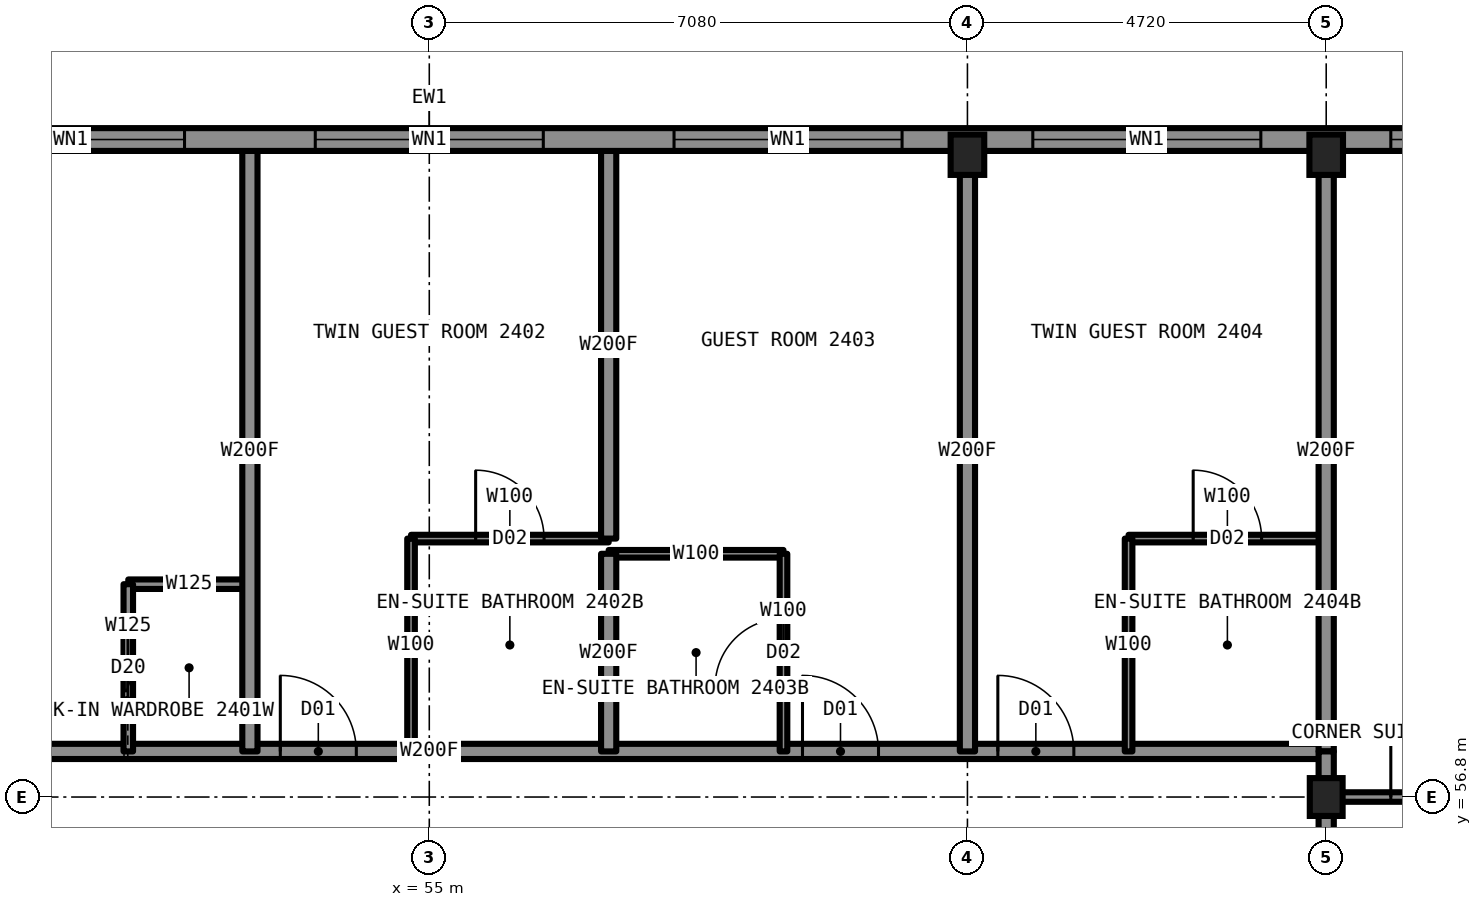
"""IFC4 building model, lengths in metres.
Left out: names, types, materials, properties, quantities, classifications, styles, units other than length and angle.
Written with IfcOpenShell. Run it as: python <this file> out.ifc"""

import sys

from ifc_helpers import new_model, si_unit, direction, frame, frame_2d, origin, origin_2d, place, context, subcontext, project, spatial, rectangle, i_section, extrude, element, fill, save


model = new_model("IFC4")
c1 = context("Model", 3, precision=1e-05, world=origin(), true_north=direction((0.0, 1.0)))
c2 = subcontext(c1, "Body", "Model", "MODEL_VIEW")
j1 = project(units=[si_unit("LENGTHUNIT", "METRE"), si_unit("PLANEANGLEUNIT", "RADIAN")], contexts=[c1])
p1 = place(None, origin())
s1 = spatial("IfcSite", under=j1, at=p1, CompositionType="ELEMENT")
p2 = place(p1, origin())
s2 = spatial("IfcBuilding", under=s1, at=p2, CompositionType="ELEMENT")
p3 = place(p2, frame((0.0, 0.0, 93.4)))
s3 = spatial("IfcBuildingStorey", under=s2, at=p3, CompositionType="ELEMENT", Elevation=93.4)
for number, where, z_axis, x_axis in (
    (1, (62.08, 65.25, 0.0), (0.0, 0.0, 1.0), (1.0, 0.0, 0.0)),
    (2, (66.8, 65.25, 0.0), (0.0, 0.0, 1.0), (1.0, 0.0, 0.0)),
):
    element("IfcColumn", number, at=place(p3, frame(where, z_axis=z_axis, x_axis=x_axis)), inside=s3, PredefinedType="COLUMN", context=c2, shape_type="SweptSolid", body=[
        extrude(i_section(OverallWidth=0.442, OverallDepth=0.531, WebThickness=0.066, FlangeThickness=0.106, at=origin_2d()), origin(), (0.0, 0.0, 1.0), 3.5),
    ])
p4 = place(p3, frame((66.8, 56.8, 0.0), z_axis=(0.0, 0.0, 1.0), x_axis=(1.0, 0.0, 0.0)))
e3 = element("IfcColumn", 3, at=p4, inside=s3, PredefinedType="COLUMN", context=c2, shape_type="SweptSolid", body=[
    extrude(i_section(OverallWidth=0.432, OverallDepth=0.498, WebThickness=0.056, FlangeThickness=0.089, at=origin_2d()), origin(), (0.0, 0.0, 1.0), 3.5),
])
p5 = place(p3, frame((66.8, 56.8, 0.0), z_axis=(0.0, 0.0, 1.0), x_axis=(1.0, 0.0, 0.0)))
e4 = element("IfcWall", 4, at=p5, inside=s3, PredefinedType="PARTITIONING", context=c2, shape_type="SweptSolid", body=[
    extrude(rectangle(XDim=8.5, YDim=0.125, at=frame_2d((4.25, 0.0))), origin(), (0.0, 0.0, 1.0), 2.573),
])
p6 = place(p5, frame((0.85, 0.0, 0.0)))
e5 = element("IfcOpeningElement", 5, at=p6, cuts=e4, PredefinedType="OPENING", context=c2, shape_type="SweptSolid", body=[
    extrude(rectangle(XDim=0.9, YDim=2.2, at=frame_2d((0.45, 1.1))), frame((0.0, 0.073, 0.0), z_axis=(0.0, -1.0, 0.0), x_axis=(1.0, 0.0, 0.0)), (0.0, 0.0, 1.0), 0.145),
])
p7 = place(p3, frame((43.2, 57.4, 0.0), z_axis=(0.0, 0.0, 1.0), x_axis=(1.0, 0.0, 0.0)))
e6 = element("IfcWall", 6, at=p7, inside=s3, PredefinedType="PARTITIONING", context=c2, shape_type="SweptSolid", body=[
    extrude(rectangle(XDim=23.6, YDim=0.2, at=frame_2d((11.8, 0.0))), origin(), (0.0, 0.0, 1.0), 3.33),
])
p8 = place(p7, frame((3.0, 0.0, 0.0)))
e7 = element("IfcOpeningElement", 7, at=p8, cuts=e6, PredefinedType="OPENING", context=c2, shape_type="SweptSolid", body=[
    extrude(rectangle(XDim=1.0, YDim=2.2, at=frame_2d((0.5, 1.1))), frame((0.0, 0.11, 0.0), z_axis=(0.0, -1.0, 0.0), x_axis=(1.0, 0.0, 0.0)), (0.0, 0.0, 1.0), 0.22),
])
p9 = place(p7, frame((9.84, 0.0, 0.0)))
e8 = element("IfcOpeningElement", 8, at=p9, cuts=e6, PredefinedType="OPENING", context=c2, shape_type="SweptSolid", body=[
    extrude(rectangle(XDim=1.0, YDim=2.2, at=frame_2d((0.5, 1.1))), frame((0.0, 0.11, 0.0), z_axis=(0.0, -1.0, 0.0), x_axis=(1.0, 0.0, 0.0)), (0.0, 0.0, 1.0), 0.22),
])
p10 = place(p7, frame((16.71, 0.0, 0.0)))
e9 = element("IfcOpeningElement", 9, at=p10, cuts=e6, PredefinedType="OPENING", context=c2, shape_type="SweptSolid", body=[
    extrude(rectangle(XDim=1.0, YDim=2.2, at=frame_2d((0.5, 1.1))), frame((0.0, 0.11, 0.0), z_axis=(0.0, -1.0, 0.0), x_axis=(1.0, 0.0, 0.0)), (0.0, 0.0, 1.0), 0.22),
])
p11 = place(p7, frame((19.28, 0.0, 0.0)))
e10 = element("IfcOpeningElement", 10, at=p11, cuts=e6, PredefinedType="OPENING", context=c2, shape_type="SweptSolid", body=[
    extrude(rectangle(XDim=1.0, YDim=2.2, at=frame_2d((0.5, 1.1))), frame((0.0, 0.11, 0.0), z_axis=(0.0, -1.0, 0.0), x_axis=(1.0, 0.0, 0.0)), (0.0, 0.0, 1.0), 0.22),
])
p12 = place(p3, frame((51.04, 59.6, 0.0), z_axis=(0.0, 0.0, 1.0), x_axis=(1.0, 0.0, 0.0)))
e11 = element("IfcWall", 11, at=p12, inside=s3, PredefinedType="PARTITIONING", context=c2, shape_type="SweptSolid", body=[
    extrude(rectangle(XDim=1.6, YDim=0.125, at=frame_2d((0.8, 0.0))), origin(), (0.0, 0.0, 1.0), 3.33),
])
p13 = place(p3, frame((57.36, 60.0, 0.0), z_axis=(0.0, 0.0, 1.0), x_axis=(1.0, 0.0, 0.0)))
e12 = element("IfcWall", 12, at=p13, inside=s3, PredefinedType="PARTITIONING", context=c2, shape_type="SweptSolid", body=[
    extrude(rectangle(XDim=2.3, YDim=0.1, at=frame_2d((1.15, 0.0))), origin(), (0.0, 0.0, 1.0), 2.731),
])
p14 = place(p3, frame((54.76, 60.2, 0.0), z_axis=(0.0, 0.0, 1.0), x_axis=(1.0, 0.0, 0.0)))
e13 = element("IfcWall", 13, at=p14, inside=s3, PredefinedType="PARTITIONING", context=c2, shape_type="SweptSolid", body=[
    extrude(rectangle(XDim=2.6, YDim=0.1, at=frame_2d((1.3, 0.0))), origin(), (0.0, 0.0, 1.0), 2.731),
])
p15 = place(p14, frame((0.85, 0.0, 0.0)))
e14 = element("IfcOpeningElement", 14, at=p15, cuts=e13, PredefinedType="OPENING", context=c2, shape_type="SweptSolid", body=[
    extrude(rectangle(XDim=0.9, YDim=2.1, at=frame_2d((0.45, 1.05))), frame((0.0, 0.06, 0.0), z_axis=(0.0, -1.0, 0.0), x_axis=(1.0, 0.0, 0.0)), (0.0, 0.0, 1.0), 0.12),
])
p16 = place(p3, frame((64.2, 60.2, 0.0), z_axis=(0.0, 0.0, 1.0), x_axis=(1.0, 0.0, 0.0)))
e15 = element("IfcWall", 15, at=p16, inside=s3, PredefinedType="PARTITIONING", context=c2, shape_type="SweptSolid", body=[
    extrude(rectangle(XDim=2.6, YDim=0.1, at=frame_2d((1.3, 0.0))), origin(), (0.0, 0.0, 1.0), 2.731),
])
p17 = place(p16, frame((0.85, 0.0, 0.0)))
e16 = element("IfcOpeningElement", 16, at=p17, cuts=e15, PredefinedType="OPENING", context=c2, shape_type="SweptSolid", body=[
    extrude(rectangle(XDim=0.9, YDim=2.1, at=frame_2d((0.45, 1.05))), frame((0.0, 0.06, 0.0), z_axis=(0.0, -1.0, 0.0), x_axis=(1.0, 0.0, 0.0)), (0.0, 0.0, 1.0), 0.12),
])
p18 = place(p3, frame((54.76, 57.4, 0.0), z_axis=(0.0, 0.0, 1.0), x_axis=(0.0, 1.0, 0.0)))
e17 = element("IfcWall", 17, at=p18, inside=s3, PredefinedType="PARTITIONING", context=c2, shape_type="SweptSolid", body=[
    extrude(rectangle(XDim=2.8, YDim=0.1, at=frame_2d((1.4, 0.0))), origin(), (0.0, 0.0, 1.0), 3.33),
])
p19 = place(p3, frame((52.64, 57.4, 0.0), z_axis=(0.0, 0.0, 1.0), x_axis=(0.0, 1.0, 0.0)))
e18 = element("IfcWall", 18, at=p19, inside=s3, PredefinedType="PARTITIONING", context=c2, shape_type="SweptSolid", body=[
    extrude(rectangle(XDim=7.9, YDim=0.2, at=frame_2d((3.95, 0.0))), origin(), (0.0, 0.0, 1.0), 3.33),
])
p20 = place(p3, frame((51.04, 57.4, 0.0), z_axis=(0.0, 0.0, 1.0), x_axis=(0.0, 1.0, 0.0)))
e19 = element("IfcWall", 19, at=p20, inside=s3, PredefinedType="PARTITIONING", context=c2, shape_type="SweptSolid", body=[
    extrude(rectangle(XDim=2.2, YDim=0.125, at=frame_2d((1.1, 0.0))), origin(), (0.0, 0.0, 1.0), 3.33),
])
p21 = place(p20, frame((0.7, 0.0, 0.0)))
e20 = element("IfcOpeningElement", 20, at=p21, cuts=e19, PredefinedType="OPENING", context=c2, shape_type="SweptSolid", body=[
    extrude(rectangle(XDim=0.8, YDim=2.1, at=frame_2d((0.4, 1.05))), frame((0.0, 0.073, 0.0), z_axis=(0.0, -1.0, 0.0), x_axis=(1.0, 0.0, 0.0)), (0.0, 0.0, 1.0), 0.145),
])
p22 = place(p3, frame((66.8, 33.22, 0.0), z_axis=(0.0, 0.0, 1.0), x_axis=(0.0, 1.0, 0.0)))
e21 = element("IfcWall", 21, at=p22, inside=s3, PredefinedType="PARTITIONING", context=c2, shape_type="SweptSolid", body=[
    extrude(rectangle(XDim=23.56, YDim=0.2, at=frame_2d((11.78, 0.0))), origin(), (0.0, 0.0, 1.0), 3.33),
])
p23 = place(p22, frame((6.16, 0.0, 0.0)))
e22 = element("IfcOpeningElement", 22, at=p23, cuts=e21, PredefinedType="OPENING", context=c2, shape_type="SweptSolid", body=[
    extrude(rectangle(XDim=1.0, YDim=2.2, at=frame_2d((0.5, 1.1))), frame((0.0, 0.11, 0.0), z_axis=(0.0, -1.0, 0.0), x_axis=(1.0, 0.0, 0.0)), (0.0, 0.0, 1.0), 0.22),
])
p24 = place(p22, frame((12.42, 0.0, 0.0)))
e23 = element("IfcOpeningElement", 23, at=p24, cuts=e21, PredefinedType="OPENING", context=c2, shape_type="SweptSolid", body=[
    extrude(rectangle(XDim=1.0, YDim=2.2, at=frame_2d((0.5, 1.1))), frame((0.0, 0.11, 0.0), z_axis=(0.0, -1.0, 0.0), x_axis=(1.0, 0.0, 0.0)), (0.0, 0.0, 1.0), 0.22),
])
p25 = place(p22, frame((21.82, 0.0, 0.0)))
e24 = element("IfcOpeningElement", 24, at=p25, cuts=e21, PredefinedType="OPENING", context=c2, shape_type="SweptSolid", body=[
    extrude(rectangle(XDim=1.1, YDim=2.2, at=frame_2d((0.55, 1.1))), frame((0.0, 0.11, 0.0), z_axis=(0.0, -1.0, 0.0), x_axis=(1.0, 0.0, 0.0)), (0.0, 0.0, 1.0), 0.22),
])
p26 = place(p22, frame((0.64, 0.0, 0.0)))
e25 = element("IfcOpeningElement", 25, at=p26, cuts=e21, PredefinedType="OPENING", context=c2, shape_type="SweptSolid", body=[
    extrude(rectangle(XDim=1.1, YDim=2.2, at=frame_2d((0.55, 1.1))), frame((0.0, 0.11, 0.0), z_axis=(0.0, -1.0, 0.0), x_axis=(1.0, 0.0, 0.0)), (0.0, 0.0, 1.0), 0.22),
])
p27 = place(p3, frame((66.8, 57.4, 0.0), z_axis=(0.0, 0.0, 1.0), x_axis=(0.0, 1.0, 0.0)))
e26 = element("IfcWall", 26, at=p27, inside=s3, PredefinedType="PARTITIONING", context=c2, shape_type="SweptSolid", body=[
    extrude(rectangle(XDim=7.9, YDim=0.2, at=frame_2d((3.95, 0.0))), origin(), (0.0, 0.0, 1.0), 2.573),
])
p28 = place(p3, frame((57.36, 57.4, 0.0), z_axis=(0.0, 0.0, 1.0), x_axis=(0.0, 1.0, 0.0)))
e27 = element("IfcWall", 27, at=p28, inside=s3, PredefinedType="PARTITIONING", context=c2, shape_type="SweptSolid", body=[
    extrude(rectangle(XDim=2.6, YDim=0.2, at=frame_2d((1.3, 0.0))), origin(), (0.0, 0.0, 1.0), 3.33),
])
p29 = place(p3, frame((57.36, 60.2, 0.0), z_axis=(0.0, 0.0, 1.0), x_axis=(0.0, 1.0, 0.0)))
e28 = element("IfcWall", 28, at=p29, inside=s3, PredefinedType="PARTITIONING", context=c2, shape_type="SweptSolid", body=[
    extrude(rectangle(XDim=5.1, YDim=0.2, at=frame_2d((2.55, 0.0))), origin(), (0.0, 0.0, 1.0), 3.33),
])
p30 = place(p3, frame((59.66, 57.4, 0.0), z_axis=(0.0, 0.0, 1.0), x_axis=(0.0, 1.0, 0.0)))
e29 = element("IfcWall", 29, at=p30, inside=s3, PredefinedType="PARTITIONING", context=c2, shape_type="SweptSolid", body=[
    extrude(rectangle(XDim=2.6, YDim=0.1, at=frame_2d((1.3, 0.0))), origin(), (0.0, 0.0, 1.0), 3.33),
])
p31 = place(p30, frame((0.85, 0.0, 0.0)))
e30 = element("IfcOpeningElement", 30, at=p31, cuts=e29, PredefinedType="OPENING", context=c2, shape_type="SweptSolid", body=[
    extrude(rectangle(XDim=0.9, YDim=2.1, at=frame_2d((0.45, 1.05))), frame((0.0, 0.06, 0.0), z_axis=(0.0, -1.0, 0.0), x_axis=(1.0, 0.0, 0.0)), (0.0, 0.0, 1.0), 0.12),
])
p32 = place(p3, frame((62.08, 57.4, 0.0), z_axis=(0.0, 0.0, 1.0), x_axis=(0.0, 1.0, 0.0)))
e31 = element("IfcWall", 31, at=p32, inside=s3, PredefinedType="PARTITIONING", context=c2, shape_type="SweptSolid", body=[
    extrude(rectangle(XDim=7.9, YDim=0.2, at=frame_2d((3.95, 0.0))), origin(), (0.0, 0.0, 1.0), 2.573),
])
p33 = place(p3, frame((64.2, 57.4, 0.0), z_axis=(0.0, 0.0, 1.0), x_axis=(0.0, 1.0, 0.0)))
e32 = element("IfcWall", 32, at=p33, inside=s3, PredefinedType="PARTITIONING", context=c2, shape_type="SweptSolid", body=[
    extrude(rectangle(XDim=2.8, YDim=0.1, at=frame_2d((1.4, 0.0))), origin(), (0.0, 0.0, 1.0), 3.33),
])
p34 = place(p3, frame((70.1, 65.45, 0.0), z_axis=(0.0, 0.0, 1.0), x_axis=(-1.0, 0.0, 0.0)))
e33 = element("IfcWall", 33, at=p34, inside=s3, PredefinedType="SOLIDWALL", context=c2, shape_type="SweptSolid", body=[
    extrude(rectangle(XDim=30.2, YDim=0.3, at=frame_2d((15.1, 0.0))), origin(), (0.0, 0.0, 1.0), 2.83),
])
p35 = place(p34, frame((0.85, 0.0, 0.5)))
e34 = element("IfcOpeningElement", 34, at=p35, cuts=e33, PredefinedType="OPENING", context=c2, shape_type="SweptSolid", body=[
    extrude(rectangle(XDim=1.6, YDim=2.0, at=frame_2d((0.8, 1.0))), frame((0.0, 0.16, 0.0), z_axis=(0.0, -1.0, 0.0), x_axis=(1.0, 0.0, 0.0)), (0.0, 0.0, 1.0), 0.32),
])
p36 = place(p34, frame((4.16, 0.0, 0.5)))
e35 = element("IfcOpeningElement", 35, at=p36, cuts=e33, PredefinedType="OPENING", context=c2, shape_type="SweptSolid", body=[
    extrude(rectangle(XDim=3.0, YDim=2.0, at=frame_2d((1.5, 1.0))), frame((0.0, 0.16, 0.0), z_axis=(0.0, -1.0, 0.0), x_axis=(1.0, 0.0, 0.0)), (0.0, 0.0, 1.0), 0.32),
])
p37 = place(p34, frame((8.88, 0.0, 0.5)))
e36 = element("IfcOpeningElement", 36, at=p37, cuts=e33, PredefinedType="OPENING", context=c2, shape_type="SweptSolid", body=[
    extrude(rectangle(XDim=3.0, YDim=2.0, at=frame_2d((1.5, 1.0))), frame((0.0, 0.16, 0.0), z_axis=(0.0, -1.0, 0.0), x_axis=(1.0, 0.0, 0.0)), (0.0, 0.0, 1.0), 0.32),
])
p38 = place(p34, frame((13.6, 0.0, 0.5)))
e37 = element("IfcOpeningElement", 37, at=p38, cuts=e33, PredefinedType="OPENING", context=c2, shape_type="SweptSolid", body=[
    extrude(rectangle(XDim=3.0, YDim=2.0, at=frame_2d((1.5, 1.0))), frame((0.0, 0.16, 0.0), z_axis=(0.0, -1.0, 0.0), x_axis=(1.0, 0.0, 0.0)), (0.0, 0.0, 1.0), 0.32),
])
p39 = place(p34, frame((18.32, 0.0, 0.5)))
e38 = element("IfcOpeningElement", 38, at=p39, cuts=e33, PredefinedType="OPENING", context=c2, shape_type="SweptSolid", body=[
    extrude(rectangle(XDim=3.0, YDim=2.0, at=frame_2d((1.5, 1.0))), frame((0.0, 0.16, 0.0), z_axis=(0.0, -1.0, 0.0), x_axis=(1.0, 0.0, 0.0)), (0.0, 0.0, 1.0), 0.32),
])
p40 = place(p34, frame((23.04, 0.0, 0.5)))
e39 = element("IfcOpeningElement", 39, at=p40, cuts=e33, PredefinedType="OPENING", context=c2, shape_type="SweptSolid", body=[
    extrude(rectangle(XDim=3.0, YDim=2.0, at=frame_2d((1.5, 1.0))), frame((0.0, 0.16, 0.0), z_axis=(0.0, -1.0, 0.0), x_axis=(1.0, 0.0, 0.0)), (0.0, 0.0, 1.0), 0.32),
])
p41 = place(p34, frame((27.75, 0.0, 0.5)))
e40 = element("IfcOpeningElement", 40, at=p41, cuts=e33, PredefinedType="OPENING", context=c2, shape_type="SweptSolid", body=[
    extrude(rectangle(XDim=1.6, YDim=2.0, at=frame_2d((0.8, 1.0))), frame((0.0, 0.16, 0.0), z_axis=(0.0, -1.0, 0.0), x_axis=(1.0, 0.0, 0.0)), (0.0, 0.0, 1.0), 0.32),
])
p42 = place(p3, frame((66.8, 56.78, 0.0), z_axis=(0.0, 0.0, 1.0), x_axis=(0.0, 1.0, 0.0)))
e41 = element("IfcWall", 41, at=p42, inside=s3, PredefinedType="PARTITIONING", context=c2, shape_type="SweptSolid", body=[
    extrude(rectangle(XDim=0.62, YDim=0.2, at=frame_2d((0.31, 0.0))), origin(), (0.0, 0.0, 1.0), 2.573),
])
p43 = place(p21, origin())
e42 = element("IfcDoor", 42, at=p43, inside=s3, OperationType="SLIDING_TO_LEFT", PredefinedType="DOOR", context=c2, shape_type="SweptSolid", body=[
    extrude(rectangle(XDim=0.8, YDim=2.1, at=frame_2d((0.4, 1.05))), frame((0.0, 0.025, 0.0), z_axis=(0.0, -1.0, 0.0), x_axis=(1.0, 0.0, 0.0)), (0.0, 0.0, 1.0), 0.05),
])
fill(e20, e42)
p44 = place(p9, origin())
e43 = element("IfcDoor", 43, at=p44, inside=s3, OperationType="SINGLE_SWING_LEFT", PredefinedType="DOOR", context=c2, shape_type="SweptSolid", body=[
    extrude(rectangle(XDim=1.0, YDim=2.2, at=frame_2d((0.5, 1.1))), frame((0.0, 0.025, 0.0), z_axis=(0.0, -1.0, 0.0), x_axis=(1.0, 0.0, 0.0)), (0.0, 0.0, 1.0), 0.05),
])
fill(e8, e43)
p45 = place(p15, origin())
e44 = element("IfcDoor", 44, at=p45, inside=s3, OperationType="SINGLE_SWING_RIGHT", PredefinedType="DOOR", context=c2, shape_type="SweptSolid", body=[
    extrude(rectangle(XDim=0.9, YDim=2.1, at=frame_2d((0.45, 1.05))), frame((0.0, 0.025, 0.0), z_axis=(0.0, -1.0, 0.0), x_axis=(1.0, 0.0, 0.0)), (0.0, 0.0, 1.0), 0.05),
])
fill(e14, e44)
p46 = place(p10, origin())
e45 = element("IfcDoor", 45, at=p46, inside=s3, OperationType="SINGLE_SWING_LEFT", PredefinedType="DOOR", context=c2, shape_type="SweptSolid", body=[
    extrude(rectangle(XDim=1.0, YDim=2.2, at=frame_2d((0.5, 1.1))), frame((0.0, 0.025, 0.0), z_axis=(0.0, -1.0, 0.0), x_axis=(1.0, 0.0, 0.0)), (0.0, 0.0, 1.0), 0.05),
])
fill(e9, e45)
p47 = place(p31, origin())
e46 = element("IfcDoor", 46, at=p47, inside=s3, OperationType="SINGLE_SWING_RIGHT", PredefinedType="DOOR", context=c2, shape_type="SweptSolid", body=[
    extrude(rectangle(XDim=0.9, YDim=2.1, at=frame_2d((0.45, 1.05))), frame((0.0, 0.025, 0.0), z_axis=(0.0, -1.0, 0.0), x_axis=(1.0, 0.0, 0.0)), (0.0, 0.0, 1.0), 0.05),
])
fill(e30, e46)
p48 = place(p11, origin())
e47 = element("IfcDoor", 47, at=p48, inside=s3, OperationType="SINGLE_SWING_LEFT", PredefinedType="DOOR", context=c2, shape_type="SweptSolid", body=[
    extrude(rectangle(XDim=1.0, YDim=2.2, at=frame_2d((0.5, 1.1))), frame((0.0, 0.025, 0.0), z_axis=(0.0, -1.0, 0.0), x_axis=(1.0, 0.0, 0.0)), (0.0, 0.0, 1.0), 0.05),
])
fill(e10, e47)
p49 = place(p17, origin())
e48 = element("IfcDoor", 48, at=p49, inside=s3, OperationType="SINGLE_SWING_RIGHT", PredefinedType="DOOR", context=c2, shape_type="SweptSolid", body=[
    extrude(rectangle(XDim=0.9, YDim=2.1, at=frame_2d((0.45, 1.05))), frame((0.0, 0.025, 0.0), z_axis=(0.0, -1.0, 0.0), x_axis=(1.0, 0.0, 0.0)), (0.0, 0.0, 1.0), 0.05),
])
fill(e16, e48)
p50 = place(p6, origin())
e49 = element("IfcDoor", 49, at=p50, inside=s3, OperationType="SINGLE_SWING_LEFT", PredefinedType="DOOR", context=c2, shape_type="SweptSolid", body=[
    extrude(rectangle(XDim=0.9, YDim=2.2, at=frame_2d((0.45, 1.1))), frame((0.0, 0.025, 0.0), z_axis=(0.0, -1.0, 0.0), x_axis=(1.0, 0.0, 0.0)), (0.0, 0.0, 1.0), 0.05),
])
fill(e5, e49)
p51 = place(p35, origin())
e50 = element("IfcWindow", 50, at=p51, inside=s3, PartitioningType="SINGLE_PANEL", PredefinedType="WINDOW", context=c2, shape_type="SweptSolid", body=[
    extrude(rectangle(XDim=1.6, YDim=2.0, at=frame_2d((0.8, 1.0))), frame((0.0, 0.03, 0.0), z_axis=(0.0, -1.0, 0.0), x_axis=(1.0, 0.0, 0.0)), (0.0, 0.0, 1.0), 0.06),
])
fill(e34, e50)
p52 = place(p36, origin())
e51 = element("IfcWindow", 51, at=p52, inside=s3, PartitioningType="SINGLE_PANEL", PredefinedType="WINDOW", context=c2, shape_type="SweptSolid", body=[
    extrude(rectangle(XDim=3.0, YDim=2.0, at=frame_2d((1.5, 1.0))), frame((0.0, 0.03, 0.0), z_axis=(0.0, -1.0, 0.0), x_axis=(1.0, 0.0, 0.0)), (0.0, 0.0, 1.0), 0.06),
])
fill(e35, e51)
p53 = place(p37, origin())
e52 = element("IfcWindow", 52, at=p53, inside=s3, PartitioningType="SINGLE_PANEL", PredefinedType="WINDOW", context=c2, shape_type="SweptSolid", body=[
    extrude(rectangle(XDim=3.0, YDim=2.0, at=frame_2d((1.5, 1.0))), frame((0.0, 0.03, 0.0), z_axis=(0.0, -1.0, 0.0), x_axis=(1.0, 0.0, 0.0)), (0.0, 0.0, 1.0), 0.06),
])
fill(e36, e52)
p54 = place(p38, origin())
e53 = element("IfcWindow", 53, at=p54, inside=s3, PartitioningType="SINGLE_PANEL", PredefinedType="WINDOW", context=c2, shape_type="SweptSolid", body=[
    extrude(rectangle(XDim=3.0, YDim=2.0, at=frame_2d((1.5, 1.0))), frame((0.0, 0.03, 0.0), z_axis=(0.0, -1.0, 0.0), x_axis=(1.0, 0.0, 0.0)), (0.0, 0.0, 1.0), 0.06),
])
fill(e37, e53)
p55 = place(p39, origin())
e54 = element("IfcWindow", 54, at=p55, inside=s3, PartitioningType="SINGLE_PANEL", PredefinedType="WINDOW", context=c2, shape_type="SweptSolid", body=[
    extrude(rectangle(XDim=3.0, YDim=2.0, at=frame_2d((1.5, 1.0))), frame((0.0, 0.03, 0.0), z_axis=(0.0, -1.0, 0.0), x_axis=(1.0, 0.0, 0.0)), (0.0, 0.0, 1.0), 0.06),
])
fill(e38, e54)
save(model, sys.argv[1])
